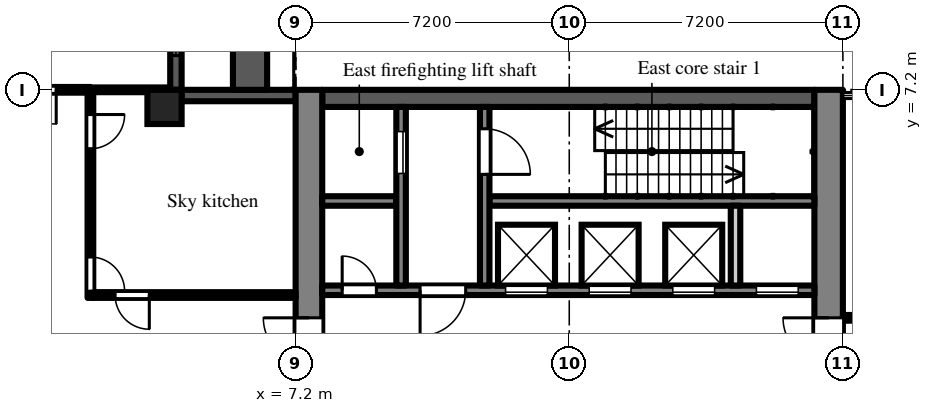
"""IFC4 building model, lengths in metres.
Left out: names, types, materials, properties, quantities, classifications, styles, units other than length and angle.
Written with IfcOpenShell. Run it as: python <this file> out.ifc"""

import sys

from ifc_helpers import new_model, si_unit, direction, frame, frame_2d, origin, origin_2d, place, context, subcontext, project, spatial, rectangle, extrude, element, fill, save


model = new_model("IFC4")
c1 = context("Model", 3, precision=1e-05, world=origin(), true_north=direction((0.0, 1.0)))
c2 = subcontext(c1, "Body", "Model", "MODEL_VIEW")
j1 = project(units=[si_unit("LENGTHUNIT", "METRE"), si_unit("PLANEANGLEUNIT", "RADIAN")], contexts=[c1])
p1 = place(None, origin())
s1 = spatial("IfcSite", under=j1, at=p1, CompositionType="ELEMENT")
p2 = place(p1, origin())
s2 = spatial("IfcBuilding", under=s1, at=p2, CompositionType="ELEMENT")
p3 = place(p2, frame((0.0, 0.0, 116.1)))
s3 = spatial("IfcBuildingStorey", under=s2, at=p3, CompositionType="ELEMENT", Elevation=116.1)
p4 = place(p3, frame((3.75, 6.75, 0.0), z_axis=(0.0, 0.0, 1.0), x_axis=(1.0, 0.0, 0.0)))
e1 = element("IfcColumn", 1, at=p4, inside=s3, PredefinedType="COLUMN", context=c2, shape_type="SweptSolid", body=[
    extrude(rectangle(XDim=0.9, YDim=0.9, at=origin_2d()), origin(), (0.0, 0.0, 1.0), 4.2),
])
p5 = place(p3, frame((7.2, 7.05, 0.0), z_axis=(0.0, 0.0, 1.0), x_axis=(-1.0, 0.0, 0.0)))
e2 = element("IfcWall", 2, at=p5, inside=s3, PredefinedType="SOLIDWALL", context=c2, shape_type="SweptSolid", body=[
    extrude(rectangle(XDim=3.0, YDim=0.3, at=frame_2d((1.5, 0.0))), origin(), (0.0, 0.0, 1.0), 3.4),
])
p6 = place(p3, frame((4.05, 7.2, 0.0), z_axis=(0.0, 0.0, 1.0), x_axis=(0.0, 1.0, 0.0)))
e3 = element("IfcWall", 3, at=p6, inside=s3, PredefinedType="SOLIDWALL", context=c2, shape_type="SweptSolid", body=[
    extrude(rectangle(XDim=7.2, YDim=0.3, at=frame_2d((3.6, 0.0))), origin(), (0.0, 0.0, 1.0), 3.4),
])
p7 = place(p6, frame((3.0, 0.0, 0.0)))
e4 = element("IfcOpeningElement", 4, at=p7, cuts=e3, PredefinedType="OPENING", context=c2, shape_type="SweptSolid", body=[
    extrude(rectangle(XDim=1.2, YDim=2.05, at=frame_2d((0.6, 1.025))), frame((0.0, 0.16, 0.0), z_axis=(0.0, -1.0, 0.0), x_axis=(1.0, 0.0, 0.0)), (0.0, 0.0, 1.0), 0.32),
])
p8 = place(p6, frame((0.9, 0.0, 0.2)))
e5 = element("IfcOpeningElement", 5, at=p8, cuts=e3, PredefinedType="OPENING", context=c2, shape_type="SweptSolid", body=[
    extrude(rectangle(XDim=1.8, YDim=1.85, at=frame_2d((0.9, 0.925))), frame((0.0, 0.16, 0.0), z_axis=(0.0, -1.0, 0.0), x_axis=(1.0, 0.0, 0.0)), (0.0, 0.0, 1.0), 0.32),
])
p9 = place(p6, frame((4.5, 0.0, 0.2)))
e6 = element("IfcOpeningElement", 6, at=p9, cuts=e3, PredefinedType="OPENING", context=c2, shape_type="SweptSolid", body=[
    extrude(rectangle(XDim=1.8, YDim=1.85, at=frame_2d((0.9, 0.925))), frame((0.0, 0.16, 0.0), z_axis=(0.0, -1.0, 0.0), x_axis=(1.0, 0.0, 0.0)), (0.0, 0.0, 1.0), 0.32),
])
p10 = place(p3, frame((6.0, 7.2, 0.0), z_axis=(0.0, 0.0, 1.0), x_axis=(0.0, 1.0, 0.0)))
e7 = element("IfcWall", 7, at=p10, inside=s3, PredefinedType="PARAPET", context=c2, shape_type="SweptSolid", body=[
    extrude(rectangle(XDim=7.2, YDim=0.9, at=frame_2d((3.6, 0.0))), origin(), (0.0, 0.0, 1.0), 0.8),
])
p11 = place(p3, frame((7.55, -7.2, 0.0), z_axis=(0.0, 0.0, 1.0), x_axis=(0.0, 1.0, 0.0)))
e8 = element("IfcWall", 8, at=p11, inside=s3, PredefinedType="SHEAR", context=c2, shape_type="SweptSolid", body=[
    extrude(rectangle(XDim=14.4, YDim=0.7, at=frame_2d((7.2, 0.0))), origin(), (0.0, 0.0, 1.0), 3.8),
])
p12 = place(p11, frame((6.0, 0.0, 0.0)))
e9 = element("IfcOpeningElement", 9, at=p12, cuts=e8, PredefinedType="OPENING", context=c2, shape_type="SweptSolid", body=[
    extrude(rectangle(XDim=2.4, YDim=2.2, at=frame_2d((1.2, 1.1))), frame((0.0, 0.36, 0.0), z_axis=(0.0, -1.0, 0.0), x_axis=(1.0, 0.0, 0.0)), (0.0, 0.0, 1.0), 0.72),
])
p13 = place(p3, frame((21.225, -7.2, 0.0), z_axis=(0.0, 0.0, 1.0), x_axis=(0.0, 1.0, 0.0)))
e10 = element("IfcWall", 10, at=p13, inside=s3, PredefinedType="SHEAR", context=c2, shape_type="SweptSolid", body=[
    extrude(rectangle(XDim=14.4, YDim=0.75, at=frame_2d((7.2, 0.0))), origin(), (0.0, 0.0, 1.0), 3.8),
])
p14 = place(p13, frame((6.0, 0.0, 0.0)))
e11 = element("IfcOpeningElement", 11, at=p14, cuts=e10, PredefinedType="OPENING", context=c2, shape_type="SweptSolid", body=[
    extrude(rectangle(XDim=2.4, YDim=2.2, at=frame_2d((1.2, 1.1))), frame((0.0, 0.385, 0.0), z_axis=(0.0, -1.0, 0.0), x_axis=(1.0, 0.0, 0.0)), (0.0, 0.0, 1.0), 0.77),
])
p15 = place(p3, frame((7.9, 6.975, 0.0), z_axis=(0.0, 0.0, 1.0), x_axis=(1.0, 0.0, 0.0)))
e12 = element("IfcWall", 12, at=p15, inside=s3, PredefinedType="SHEAR", context=c2, shape_type="SweptSolid", body=[
    extrude(rectangle(XDim=12.95, YDim=0.45, at=frame_2d((6.475, 0.0))), origin(), (0.0, 0.0, 1.0), 3.8),
])
p16 = place(p3, frame((7.9, 1.925, 0.0), z_axis=(0.0, 0.0, 1.0), x_axis=(1.0, 0.0, 0.0)))
e13 = element("IfcWall", 13, at=p16, inside=s3, PredefinedType="SHEAR", context=c2, shape_type="SweptSolid", body=[
    extrude(rectangle(XDim=12.95, YDim=0.25, at=frame_2d((6.475, 0.0))), origin(), (0.0, 0.0, 1.0), 3.8),
])
p17 = place(p16, frame((4.825, 0.0, 0.0)))
e14 = element("IfcOpeningElement", 14, at=p17, cuts=e13, PredefinedType="OPENING", context=c2, shape_type="SweptSolid", body=[
    extrude(rectangle(XDim=1.1, YDim=2.1, at=frame_2d((0.55, 1.05))), frame((0.0, 0.135, 0.0), z_axis=(0.0, -1.0, 0.0), x_axis=(1.0, 0.0, 0.0)), (0.0, 0.0, 1.0), 0.27),
])
p18 = place(p16, frame((7.025, 0.0, 0.0)))
e15 = element("IfcOpeningElement", 15, at=p18, cuts=e13, PredefinedType="OPENING", context=c2, shape_type="SweptSolid", body=[
    extrude(rectangle(XDim=1.1, YDim=2.1, at=frame_2d((0.55, 1.05))), frame((0.0, 0.135, 0.0), z_axis=(0.0, -1.0, 0.0), x_axis=(1.0, 0.0, 0.0)), (0.0, 0.0, 1.0), 0.27),
])
p19 = place(p16, frame((9.225, 0.0, 0.0)))
e16 = element("IfcOpeningElement", 16, at=p19, cuts=e13, PredefinedType="OPENING", context=c2, shape_type="SweptSolid", body=[
    extrude(rectangle(XDim=1.1, YDim=2.1, at=frame_2d((0.55, 1.05))), frame((0.0, 0.135, 0.0), z_axis=(0.0, -1.0, 0.0), x_axis=(1.0, 0.0, 0.0)), (0.0, 0.0, 1.0), 0.27),
])
p20 = place(p16, frame((11.425, 0.0, 0.0)))
e17 = element("IfcOpeningElement", 17, at=p20, cuts=e13, PredefinedType="OPENING", context=c2, shape_type="SweptSolid", body=[
    extrude(rectangle(XDim=1.1, YDim=2.1, at=frame_2d((0.55, 1.05))), frame((0.0, 0.135, 0.0), z_axis=(0.0, -1.0, 0.0), x_axis=(1.0, 0.0, 0.0)), (0.0, 0.0, 1.0), 0.27),
])
p21 = place(p16, frame((0.525, 0.0, 0.0)))
e18 = element("IfcOpeningElement", 18, at=p21, cuts=e13, PredefinedType="OPENING", context=c2, shape_type="SweptSolid", body=[
    extrude(rectangle(XDim=0.9, YDim=2.1, at=frame_2d((0.45, 1.05))), frame((0.0, 0.135, 0.0), z_axis=(0.0, -1.0, 0.0), x_axis=(1.0, 0.0, 0.0)), (0.0, 0.0, 1.0), 0.27),
])
p22 = place(p16, frame((2.575, 0.0, 0.0)))
e19 = element("IfcOpeningElement", 19, at=p22, cuts=e13, PredefinedType="OPENING", context=c2, shape_type="SweptSolid", body=[
    extrude(rectangle(XDim=1.2, YDim=2.1, at=frame_2d((0.6, 1.05))), frame((0.0, 0.135, 0.0), z_axis=(0.0, -1.0, 0.0), x_axis=(1.0, 0.0, 0.0)), (0.0, 0.0, 1.0), 0.27),
])
p23 = place(p3, frame((7.9, 4.275, 0.0), z_axis=(0.0, 0.0, 1.0), x_axis=(1.0, 0.0, 0.0)))
e20 = element("IfcWall", 20, at=p23, inside=s3, PredefinedType="SHEAR", context=c2, shape_type="SweptSolid", body=[
    extrude(rectangle(XDim=1.95, YDim=0.25, at=frame_2d((0.975, 0.0))), origin(), (0.0, 0.0, 1.0), 3.8),
])
p24 = place(p3, frame((12.3, 4.275, 0.0), z_axis=(0.0, 0.0, 1.0), x_axis=(1.0, 0.0, 0.0)))
e21 = element("IfcWall", 21, at=p24, inside=s3, PredefinedType="SHEAR", context=c2, shape_type="SweptSolid", body=[
    extrude(rectangle(XDim=8.55, YDim=0.25, at=frame_2d((4.275, 0.0))), origin(), (0.0, 0.0, 1.0), 3.8),
])
p25 = place(p3, frame((9.975, 2.05, 0.0), z_axis=(0.0, 0.0, 1.0), x_axis=(0.0, 1.0, 0.0)))
e22 = element("IfcWall", 22, at=p25, inside=s3, PredefinedType="SHEAR", context=c2, shape_type="SweptSolid", body=[
    extrude(rectangle(XDim=4.7, YDim=0.25, at=frame_2d((2.35, 0.0))), origin(), (0.0, 0.0, 1.0), 3.8),
])
p26 = place(p25, frame((2.95, 0.0, 0.0)))
e23 = element("IfcOpeningElement", 23, at=p26, cuts=e22, PredefinedType="OPENING", context=c2, shape_type="SweptSolid", body=[
    extrude(rectangle(XDim=1.1, YDim=2.1, at=frame_2d((0.55, 1.05))), frame((0.0, 0.135, 0.0), z_axis=(0.0, -1.0, 0.0), x_axis=(1.0, 0.0, 0.0)), (0.0, 0.0, 1.0), 0.27),
])
p27 = place(p3, frame((12.175, 2.05, 0.0), z_axis=(0.0, 0.0, 1.0), x_axis=(0.0, 1.0, 0.0)))
e24 = element("IfcWall", 24, at=p27, inside=s3, PredefinedType="SHEAR", context=c2, shape_type="SweptSolid", body=[
    extrude(rectangle(XDim=4.7, YDim=0.25, at=frame_2d((2.35, 0.0))), origin(), (0.0, 0.0, 1.0), 3.8),
])
p28 = place(p27, frame((2.925, 0.0, 0.0)))
e25 = element("IfcOpeningElement", 25, at=p28, cuts=e24, PredefinedType="OPENING", context=c2, shape_type="SweptSolid", body=[
    extrude(rectangle(XDim=1.2, YDim=2.1, at=frame_2d((0.6, 1.05))), frame((0.0, 0.135, 0.0), z_axis=(0.0, -1.0, 0.0), x_axis=(1.0, 0.0, 0.0)), (0.0, 0.0, 1.0), 0.27),
])
p29 = place(p3, frame((18.775, 2.05, 0.0), z_axis=(0.0, 0.0, 1.0), x_axis=(0.0, 1.0, 0.0)))
e26 = element("IfcWall", 26, at=p29, inside=s3, PredefinedType="PARTITIONING", context=c2, shape_type="SweptSolid", body=[
    extrude(rectangle(XDim=2.1, YDim=0.25, at=frame_2d((1.05, 0.0))), origin(), (0.0, 0.0, 1.0), 3.8),
])
p30 = place(p3, frame((-1.8, 7.2, 0.0), z_axis=(0.0, 0.0, 1.0), x_axis=(1.0, 0.0, 0.0)))
e27 = element("IfcWall", 27, at=p30, inside=s3, PredefinedType="PARTITIONING", context=c2, shape_type="SweptSolid", body=[
    extrude(rectangle(XDim=3.6, YDim=0.15, at=frame_2d((1.8, 0.0))), origin(), (0.0, 0.0, 1.0), 3.8),
])
p31 = place(p30, frame((0.9, 0.0, 0.0)))
e28 = element("IfcOpeningElement", 28, at=p31, cuts=e27, PredefinedType="OPENING", context=c2, shape_type="SweptSolid", body=[
    extrude(rectangle(XDim=1.8, YDim=2.1, at=frame_2d((0.9, 1.05))), frame((0.0, 0.085, 0.0), z_axis=(0.0, -1.0, 0.0), x_axis=(1.0, 0.0, 0.0)), (0.0, 0.0, 1.0), 0.17),
])
p32 = place(p3, frame((1.8, 1.725, 0.0), z_axis=(0.0, 0.0, 1.0), x_axis=(0.0, 1.0, 0.0)))
e29 = element("IfcWall", 29, at=p32, inside=s3, PredefinedType="PARTITIONING", context=c2, shape_type="SweptSolid", body=[
    extrude(rectangle(XDim=5.4, YDim=0.15, at=frame_2d((2.7, 0.0))), origin(), (0.0, 0.0, 1.0), 3.8),
])
p33 = place(p32, frame((0.175, 0.0, 0.0)))
e30 = element("IfcOpeningElement", 30, at=p33, cuts=e29, PredefinedType="OPENING", context=c2, shape_type="SweptSolid", body=[
    extrude(rectangle(XDim=0.9, YDim=2.1, at=frame_2d((0.45, 1.05))), frame((0.0, 0.085, 0.0), z_axis=(0.0, -1.0, 0.0), x_axis=(1.0, 0.0, 0.0)), (0.0, 0.0, 1.0), 0.17),
])
p34 = place(p32, frame((3.925, 0.0, 0.0)))
e31 = element("IfcOpeningElement", 31, at=p34, cuts=e29, PredefinedType="OPENING", context=c2, shape_type="SweptSolid", body=[
    extrude(rectangle(XDim=0.9, YDim=2.1, at=frame_2d((0.45, 1.05))), frame((0.0, 0.085, 0.0), z_axis=(0.0, -1.0, 0.0), x_axis=(1.0, 0.0, 0.0)), (0.0, 0.0, 1.0), 0.17),
])
p35 = place(p3, frame((1.875, 1.8, 0.0), z_axis=(0.0, 0.0, 1.0), x_axis=(1.0, 0.0, 0.0)))
e32 = element("IfcWall", 32, at=p35, inside=s3, PredefinedType="PARTITIONING", context=c2, shape_type="SweptSolid", body=[
    extrude(rectangle(XDim=5.325, YDim=0.15, at=frame_2d((2.663, 0.0))), origin(), (0.0, 0.0, 1.0), 3.8),
])
p36 = place(p35, frame((0.575, 0.0, 0.0)))
e33 = element("IfcOpeningElement", 33, at=p36, cuts=e32, PredefinedType="OPENING", context=c2, shape_type="SweptSolid", body=[
    extrude(rectangle(XDim=0.9, YDim=2.1, at=frame_2d((0.45, 1.05))), frame((0.0, 0.085, 0.0), z_axis=(0.0, -1.0, 0.0), x_axis=(1.0, 0.0, 0.0)), (0.0, 0.0, 1.0), 0.17),
])
p37 = place(p3, frame((1.8, 7.2, 0.0), z_axis=(0.0, 0.0, 1.0), x_axis=(1.0, 0.0, 0.0)))
e34 = element("IfcWall", 34, at=p37, inside=s3, PredefinedType="PARTITIONING", context=c2, shape_type="SweptSolid", body=[
    extrude(rectangle(XDim=2.1, YDim=0.125, at=frame_2d((1.05, 0.0))), origin(), (0.0, 0.0, 1.0), 3.8),
])
p38 = place(p3, frame((21.6, 1.2, 0.0), z_axis=(0.0, 0.0, 1.0), x_axis=(1.0, 0.0, 0.0)))
e35 = element("IfcWall", 35, at=p38, inside=s3, PredefinedType="PARTITIONING", context=c2, shape_type="SweptSolid", body=[
    extrude(rectangle(XDim=14.9, YDim=0.15, at=frame_2d((7.45, 0.0))), origin(), (0.0, 0.0, 1.0), 3.8),
])
p39 = place(p38, frame((0.65, 0.0, 0.0)))
e36 = element("IfcOpeningElement", 36, at=p39, cuts=e35, PredefinedType="OPENING", context=c2, shape_type="SweptSolid", body=[
    extrude(rectangle(XDim=1.8, YDim=2.1, at=frame_2d((0.9, 1.05))), frame((0.0, 0.085, 0.0), z_axis=(0.0, -1.0, 0.0), x_axis=(1.0, 0.0, 0.0)), (0.0, 0.0, 1.0), 0.17),
])
p40 = place(p38, frame((5.5, 0.0, 0.0)))
e37 = element("IfcOpeningElement", 37, at=p40, cuts=e35, PredefinedType="OPENING", context=c2, shape_type="SweptSolid", body=[
    extrude(rectangle(XDim=1.0, YDim=2.1, at=frame_2d((0.5, 1.05))), frame((0.0, 0.085, 0.0), z_axis=(0.0, -1.0, 0.0), x_axis=(1.0, 0.0, 0.0)), (0.0, 0.0, 1.0), 0.17),
])
p41 = place(p38, frame((9.35, 0.0, 0.0)))
e38 = element("IfcOpeningElement", 38, at=p41, cuts=e35, PredefinedType="OPENING", context=c2, shape_type="SweptSolid", body=[
    extrude(rectangle(XDim=1.8, YDim=2.1, at=frame_2d((0.9, 1.05))), frame((0.0, 0.085, 0.0), z_axis=(0.0, -1.0, 0.0), x_axis=(1.0, 0.0, 0.0)), (0.0, 0.0, 1.0), 0.17),
])
p42 = place(p38, frame((12.95, 0.0, 0.0)))
e39 = element("IfcOpeningElement", 39, at=p42, cuts=e35, PredefinedType="OPENING", context=c2, shape_type="SweptSolid", body=[
    extrude(rectangle(XDim=1.0, YDim=2.1, at=frame_2d((0.5, 1.05))), frame((0.0, 0.085, 0.0), z_axis=(0.0, -1.0, 0.0), x_axis=(1.0, 0.0, 0.0)), (0.0, 0.0, 1.0), 0.17),
])
p43 = place(p8, origin())
e40 = element("IfcWindow", 40, at=p43, inside=s3, PartitioningType="SINGLE_PANEL", PredefinedType="WINDOW", context=c2, shape_type="SweptSolid", body=[
    extrude(rectangle(XDim=1.8, YDim=1.85, at=frame_2d((0.9, 0.925))), frame((0.0, 0.03, 0.0), z_axis=(0.0, -1.0, 0.0), x_axis=(1.0, 0.0, 0.0)), (0.0, 0.0, 1.0), 0.06),
])
fill(e5, e40)
p44 = place(p17, origin())
e41 = element("IfcDoor", 41, at=p44, inside=s3, OperationType="SLIDING_TO_LEFT", PredefinedType="DOOR", context=c2, shape_type="SweptSolid", body=[
    extrude(rectangle(XDim=1.1, YDim=2.1, at=frame_2d((0.55, 1.05))), frame((0.0, 0.025, 0.0), z_axis=(0.0, -1.0, 0.0), x_axis=(1.0, 0.0, 0.0)), (0.0, 0.0, 1.0), 0.05),
])
fill(e14, e41)
p45 = place(p18, origin())
e42 = element("IfcDoor", 42, at=p45, inside=s3, OperationType="SLIDING_TO_LEFT", PredefinedType="DOOR", context=c2, shape_type="SweptSolid", body=[
    extrude(rectangle(XDim=1.1, YDim=2.1, at=frame_2d((0.55, 1.05))), frame((0.0, 0.025, 0.0), z_axis=(0.0, -1.0, 0.0), x_axis=(1.0, 0.0, 0.0)), (0.0, 0.0, 1.0), 0.05),
])
fill(e15, e42)
p46 = place(p19, origin())
e43 = element("IfcDoor", 43, at=p46, inside=s3, OperationType="SLIDING_TO_LEFT", PredefinedType="DOOR", context=c2, shape_type="SweptSolid", body=[
    extrude(rectangle(XDim=1.1, YDim=2.1, at=frame_2d((0.55, 1.05))), frame((0.0, 0.025, 0.0), z_axis=(0.0, -1.0, 0.0), x_axis=(1.0, 0.0, 0.0)), (0.0, 0.0, 1.0), 0.05),
])
fill(e16, e43)
p47 = place(p20, origin())
e44 = element("IfcDoor", 44, at=p47, inside=s3, OperationType="SLIDING_TO_LEFT", PredefinedType="DOOR", context=c2, shape_type="SweptSolid", body=[
    extrude(rectangle(XDim=1.1, YDim=2.1, at=frame_2d((0.55, 1.05))), frame((0.0, 0.025, 0.0), z_axis=(0.0, -1.0, 0.0), x_axis=(1.0, 0.0, 0.0)), (0.0, 0.0, 1.0), 0.05),
])
fill(e17, e44)
p48 = place(p26, origin())
e45 = element("IfcDoor", 45, at=p48, inside=s3, OperationType="SLIDING_TO_LEFT", PredefinedType="DOOR", context=c2, shape_type="SweptSolid", body=[
    extrude(rectangle(XDim=1.1, YDim=2.1, at=frame_2d((0.55, 1.05))), frame((0.0, 0.025, 0.0), z_axis=(0.0, -1.0, 0.0), x_axis=(1.0, 0.0, 0.0)), (0.0, 0.0, 1.0), 0.05),
])
fill(e23, e45)
p49 = place(p28, frame((1.2, 0.0, 0.0), z_axis=(0.0, 0.0, 1.0), x_axis=(-1.0, 0.0, 0.0)))
e46 = element("IfcDoor", 46, at=p49, inside=s3, OperationType="SINGLE_SWING_RIGHT", PredefinedType="DOOR", context=c2, shape_type="SweptSolid", body=[
    extrude(rectangle(XDim=1.2, YDim=2.1, at=frame_2d((0.6, 1.05))), frame((0.0, 0.025, 0.0), z_axis=(0.0, -1.0, 0.0), x_axis=(1.0, 0.0, 0.0)), (0.0, 0.0, 1.0), 0.05),
])
fill(e25, e46)
p50 = place(p21, origin())
e47 = element("IfcDoor", 47, at=p50, inside=s3, OperationType="SINGLE_SWING_LEFT", PredefinedType="DOOR", context=c2, shape_type="SweptSolid", body=[
    extrude(rectangle(XDim=0.9, YDim=2.1, at=frame_2d((0.45, 1.05))), frame((0.0, 0.025, 0.0), z_axis=(0.0, -1.0, 0.0), x_axis=(1.0, 0.0, 0.0)), (0.0, 0.0, 1.0), 0.05),
])
fill(e18, e47)
p51 = place(p22, frame((1.2, 0.0, 0.0), z_axis=(0.0, 0.0, 1.0), x_axis=(-1.0, 0.0, 0.0)))
e48 = element("IfcDoor", 48, at=p51, inside=s3, OperationType="SINGLE_SWING_RIGHT", PredefinedType="DOOR", context=c2, shape_type="SweptSolid", body=[
    extrude(rectangle(XDim=1.2, YDim=2.1, at=frame_2d((0.6, 1.05))), frame((0.0, 0.025, 0.0), z_axis=(0.0, -1.0, 0.0), x_axis=(1.0, 0.0, 0.0)), (0.0, 0.0, 1.0), 0.05),
])
fill(e19, e48)
p52 = place(p12, origin())
e49 = element("IfcDoor", 49, at=p52, inside=s3, OperationType="DOUBLE_DOOR_DOUBLE_SWING", PredefinedType="DOOR", context=c2, shape_type="SweptSolid", body=[
    extrude(rectangle(XDim=2.4, YDim=2.2, at=frame_2d((1.2, 1.1))), frame((0.0, 0.025, 0.0), z_axis=(0.0, -1.0, 0.0), x_axis=(1.0, 0.0, 0.0)), (0.0, 0.0, 1.0), 0.05),
])
fill(e9, e49)
p53 = place(p14, origin())
e50 = element("IfcDoor", 50, at=p53, inside=s3, OperationType="DOUBLE_DOOR_DOUBLE_SWING", PredefinedType="DOOR", context=c2, shape_type="SweptSolid", body=[
    extrude(rectangle(XDim=2.4, YDim=2.2, at=frame_2d((1.2, 1.1))), frame((0.0, 0.025, 0.0), z_axis=(0.0, -1.0, 0.0), x_axis=(1.0, 0.0, 0.0)), (0.0, 0.0, 1.0), 0.05),
])
fill(e11, e50)
p54 = place(p33, frame((0.9, 0.0, 0.0), z_axis=(0.0, 0.0, 1.0), x_axis=(-1.0, 0.0, 0.0)))
e51 = element("IfcDoor", 51, at=p54, inside=s3, OperationType="SINGLE_SWING_RIGHT", PredefinedType="DOOR", context=c2, shape_type="SweptSolid", body=[
    extrude(rectangle(XDim=0.9, YDim=2.1, at=frame_2d((0.45, 1.05))), frame((0.0, 0.025, 0.0), z_axis=(0.0, -1.0, 0.0), x_axis=(1.0, 0.0, 0.0)), (0.0, 0.0, 1.0), 0.05),
])
fill(e30, e51)
p55 = place(p34, frame((0.9, 0.0, 0.0), z_axis=(0.0, 0.0, 1.0), x_axis=(-1.0, 0.0, 0.0)))
e52 = element("IfcDoor", 52, at=p55, inside=s3, OperationType="SINGLE_SWING_LEFT", PredefinedType="DOOR", context=c2, shape_type="SweptSolid", body=[
    extrude(rectangle(XDim=0.9, YDim=2.1, at=frame_2d((0.45, 1.05))), frame((0.0, 0.025, 0.0), z_axis=(0.0, -1.0, 0.0), x_axis=(1.0, 0.0, 0.0)), (0.0, 0.0, 1.0), 0.05),
])
fill(e31, e52)
p56 = place(p36, frame((0.9, 0.0, 0.0), z_axis=(0.0, 0.0, 1.0), x_axis=(-1.0, 0.0, 0.0)))
e53 = element("IfcDoor", 53, at=p56, inside=s3, OperationType="SINGLE_SWING_LEFT", PredefinedType="DOOR", context=c2, shape_type="SweptSolid", body=[
    extrude(rectangle(XDim=0.9, YDim=2.1, at=frame_2d((0.45, 1.05))), frame((0.0, 0.025, 0.0), z_axis=(0.0, -1.0, 0.0), x_axis=(1.0, 0.0, 0.0)), (0.0, 0.0, 1.0), 0.05),
])
fill(e33, e53)
p57 = place(p31, frame((1.8, 0.0, 0.0), z_axis=(0.0, 0.0, 1.0), x_axis=(-1.0, 0.0, 0.0)))
e54 = element("IfcDoor", 54, at=p57, inside=s3, OperationType="DOUBLE_DOOR_DOUBLE_SWING", PredefinedType="DOOR", context=c2, shape_type="SweptSolid", body=[
    extrude(rectangle(XDim=1.8, YDim=2.1, at=frame_2d((0.9, 1.05))), frame((0.0, 0.025, 0.0), z_axis=(0.0, -1.0, 0.0), x_axis=(1.0, 0.0, 0.0)), (0.0, 0.0, 1.0), 0.05),
])
fill(e28, e54)
save(model, sys.argv[1])
